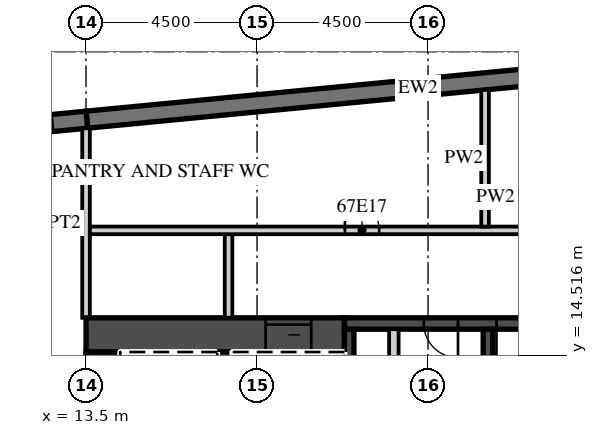
"""IFC4 building model, lengths in metres.
Left out: names, types, materials, properties, quantities, classifications, styles, units other than length and angle.
Written with IfcOpenShell. Run it as: python <this file> out.ifc"""

import sys

from ifc_helpers import new_model, si_unit, direction, frame, frame_2d, origin, place, context, subcontext, project, spatial, rectangle, extrude, element, fill, save


model = new_model("IFC4")
c1 = context("Model", 3, precision=1e-05, world=origin(), true_north=direction((0.0, 1.0)))
c2 = subcontext(c1, "Body", "Model", "MODEL_VIEW")
j1 = project(units=[si_unit("LENGTHUNIT", "METRE"), si_unit("PLANEANGLEUNIT", "RADIAN")], contexts=[c1])
p1 = place(None, origin())
s1 = spatial("IfcSite", under=j1, at=p1, CompositionType="ELEMENT")
p2 = place(p1, origin())
s2 = spatial("IfcBuilding", under=s1, at=p2, CompositionType="ELEMENT")
p3 = place(p2, frame((0.0, 0.0, 271.8)))
s3 = spatial("IfcBuildingStorey", under=s2, at=p3, CompositionType="ELEMENT", Elevation=271.8)
p4 = place(p3, frame((30.946, 22.391, 0.0), z_axis=(0.0, 0.0, 1.0), x_axis=(-0.995396397117, -0.095843688398, 0.0)))
e1 = element("IfcWall", 1, at=p4, inside=s3, PredefinedType="SOLIDWALL", context=c2, shape_type="SweptSolid", body=[
    extrude(rectangle(XDim=17.505, YDim=0.45, at=frame_2d((8.752, 0.0))), origin(), (0.0, 0.0, 1.0), 3.02),
])
p5 = place(p3, frame((13.521, 20.713, 0.0), z_axis=(0.0, 0.0, 1.0), x_axis=(-0.995396277313, -0.095844932638, 0.0)))
e2 = element("IfcWall", 2, at=p5, inside=s3, PredefinedType="SOLIDWALL", context=c2, shape_type="SweptSolid", body=[
    extrude(rectangle(XDim=51.495, YDim=0.45, at=frame_2d((25.748, 0.0))), origin(), (0.0, 0.0, 1.0), 3.02),
])
p6 = place(p5, frame((0.91, 0.0, 0.45)))
e3 = element("IfcOpeningElement", 3, at=p6, cuts=e2, PredefinedType="OPENING", context=c2, shape_type="SweptSolid", body=[
    extrude(rectangle(XDim=2.7, YDim=2.25, at=frame_2d((1.35, 1.125))), frame((0.0, 0.235, 0.0), z_axis=(0.0, -1.0, 0.0), x_axis=(1.0, 0.0, 0.0)), (0.0, 0.0, 1.0), 0.47),
])
p7 = place(p5, frame((5.431, 0.0, 0.45)))
e4 = element("IfcOpeningElement", 4, at=p7, cuts=e2, PredefinedType="OPENING", context=c2, shape_type="SweptSolid", body=[
    extrude(rectangle(XDim=2.7, YDim=2.25, at=frame_2d((1.35, 1.125))), frame((0.0, 0.235, 0.0), z_axis=(0.0, -1.0, 0.0), x_axis=(1.0, 0.0, 0.0)), (0.0, 0.0, 1.0), 0.47),
])
p8 = place(p5, frame((9.952, 0.0, 0.45)))
e5 = element("IfcOpeningElement", 5, at=p8, cuts=e2, PredefinedType="OPENING", context=c2, shape_type="SweptSolid", body=[
    extrude(rectangle(XDim=2.7, YDim=2.25, at=frame_2d((1.35, 1.125))), frame((0.0, 0.235, 0.0), z_axis=(0.0, -1.0, 0.0), x_axis=(1.0, 0.0, 0.0)), (0.0, 0.0, 1.0), 0.47),
])
p9 = place(p5, frame((14.473, 0.0, 0.45)))
e6 = element("IfcOpeningElement", 6, at=p9, cuts=e2, PredefinedType="OPENING", context=c2, shape_type="SweptSolid", body=[
    extrude(rectangle(XDim=2.7, YDim=2.25, at=frame_2d((1.35, 1.125))), frame((0.0, 0.235, 0.0), z_axis=(0.0, -1.0, 0.0), x_axis=(1.0, 0.0, 0.0)), (0.0, 0.0, 1.0), 0.47),
])
p10 = place(p5, frame((18.994, 0.0, 0.45)))
e7 = element("IfcOpeningElement", 7, at=p10, cuts=e2, PredefinedType="OPENING", context=c2, shape_type="SweptSolid", body=[
    extrude(rectangle(XDim=2.7, YDim=2.25, at=frame_2d((1.35, 1.125))), frame((0.0, 0.235, 0.0), z_axis=(0.0, -1.0, 0.0), x_axis=(1.0, 0.0, 0.0)), (0.0, 0.0, 1.0), 0.47),
])
p11 = place(p5, frame((23.514, 0.0, 0.45)))
e8 = element("IfcOpeningElement", 8, at=p11, cuts=e2, PredefinedType="OPENING", context=c2, shape_type="SweptSolid", body=[
    extrude(rectangle(XDim=2.7, YDim=2.25, at=frame_2d((1.35, 1.125))), frame((0.0, 0.235, 0.0), z_axis=(0.0, -1.0, 0.0), x_axis=(1.0, 0.0, 0.0)), (0.0, 0.0, 1.0), 0.47),
])
p12 = place(p5, frame((28.035, 0.0, 0.45)))
e9 = element("IfcOpeningElement", 9, at=p12, cuts=e2, PredefinedType="OPENING", context=c2, shape_type="SweptSolid", body=[
    extrude(rectangle(XDim=2.7, YDim=2.25, at=frame_2d((1.35, 1.125))), frame((0.0, 0.235, 0.0), z_axis=(0.0, -1.0, 0.0), x_axis=(1.0, 0.0, 0.0)), (0.0, 0.0, 1.0), 0.47),
])
p13 = place(p5, frame((32.556, 0.0, 0.45)))
e10 = element("IfcOpeningElement", 10, at=p13, cuts=e2, PredefinedType="OPENING", context=c2, shape_type="SweptSolid", body=[
    extrude(rectangle(XDim=2.7, YDim=2.25, at=frame_2d((1.35, 1.125))), frame((0.0, 0.235, 0.0), z_axis=(0.0, -1.0, 0.0), x_axis=(1.0, 0.0, 0.0)), (0.0, 0.0, 1.0), 0.47),
])
p14 = place(p5, frame((37.077, 0.0, 0.45)))
e11 = element("IfcOpeningElement", 11, at=p14, cuts=e2, PredefinedType="OPENING", context=c2, shape_type="SweptSolid", body=[
    extrude(rectangle(XDim=2.7, YDim=2.25, at=frame_2d((1.35, 1.125))), frame((0.0, 0.235, 0.0), z_axis=(0.0, -1.0, 0.0), x_axis=(1.0, 0.0, 0.0)), (0.0, 0.0, 1.0), 0.47),
])
p15 = place(p5, frame((41.598, 0.0, 0.45)))
e12 = element("IfcOpeningElement", 12, at=p15, cuts=e2, PredefinedType="OPENING", context=c2, shape_type="SweptSolid", body=[
    extrude(rectangle(XDim=2.7, YDim=2.25, at=frame_2d((1.35, 1.125))), frame((0.0, 0.235, 0.0), z_axis=(0.0, -1.0, 0.0), x_axis=(1.0, 0.0, 0.0)), (0.0, 0.0, 1.0), 0.47),
])
p16 = place(p5, frame((46.118, 0.0, 0.45)))
e13 = element("IfcOpeningElement", 13, at=p16, cuts=e2, PredefinedType="OPENING", context=c2, shape_type="SweptSolid", body=[
    extrude(rectangle(XDim=2.7, YDim=2.25, at=frame_2d((1.35, 1.125))), frame((0.0, 0.235, 0.0), z_axis=(0.0, -1.0, 0.0), x_axis=(1.0, 0.0, 0.0)), (0.0, 0.0, 1.0), 0.47),
])
p17 = place(p3, frame((13.5, 15.5, 0.0), z_axis=(0.0, 0.0, 1.0), x_axis=(0.0, 1.0, 0.0)))
e14 = element("IfcWall", 14, at=p17, inside=s3, PredefinedType="PARTITIONING", context=c2, shape_type="SweptSolid", body=[
    extrude(rectangle(XDim=4.985, YDim=0.2, at=frame_2d((2.493, 0.0))), origin(), (0.0, 0.0, 1.0), 3.02),
])
p18 = place(p3, frame((13.5, 15.05, 0.0), z_axis=(0.0, 0.0, 1.0), x_axis=(1.0, 0.0, 0.0)))
e15 = element("IfcWall", 15, at=p18, inside=s3, PredefinedType="SHEAR", context=c2, shape_type="SweptSolid", body=[
    extrude(rectangle(XDim=6.8, YDim=0.9, at=frame_2d((3.4, 0.0))), origin(), (0.0, 0.0, 1.0), 3.02),
])
p19 = place(p18, frame((4.725, 0.0, 0.0)))
e16 = element("IfcOpeningElement", 16, at=p19, cuts=e15, PredefinedType="OPENING", context=c2, shape_type="SweptSolid", body=[
    extrude(rectangle(XDim=1.2, YDim=2.1, at=frame_2d((0.6, 1.05))), frame((0.0, 0.46, 0.0), z_axis=(0.0, -1.0, 0.0), x_axis=(1.0, 0.0, 0.0)), (0.0, 0.0, 1.0), 0.92),
])
p20 = place(p3, frame((20.3, 15.35, 0.0), z_axis=(0.0, 0.0, 1.0), x_axis=(1.0, 0.0, 0.0)))
e17 = element("IfcWall", 17, at=p20, inside=s3, PredefinedType="SHEAR", context=c2, shape_type="SweptSolid", body=[
    extrude(rectangle(XDim=10.3, YDim=0.3, at=frame_2d((5.15, 0.0))), origin(), (0.0, 0.0, 1.0), 3.02),
])
p21 = place(p20, frame((4.0, 0.0, 0.0)))
e18 = element("IfcOpeningElement", 18, at=p21, cuts=e17, PredefinedType="OPENING", context=c2, shape_type="SweptSolid", body=[
    extrude(rectangle(XDim=1.3, YDim=2.1, at=frame_2d((0.65, 1.05))), frame((0.0, 0.16, 0.0), z_axis=(0.0, -1.0, 0.0), x_axis=(1.0, 0.0, 0.0)), (0.0, 0.0, 1.0), 0.32),
])
p22 = place(p20, frame((2.087, 0.0, 0.0)))
e19 = element("IfcOpeningElement", 19, at=p22, cuts=e17, PredefinedType="OPENING", context=c2, shape_type="SweptSolid", body=[
    extrude(rectangle(XDim=0.9, YDim=2.1, at=frame_2d((0.45, 1.05))), frame((0.0, 0.16, 0.0), z_axis=(0.0, -1.0, 0.0), x_axis=(1.0, 0.0, 0.0)), (0.0, 0.0, 1.0), 0.32),
])
p23 = place(p3, frame((13.95, 2.4, 0.0), z_axis=(0.0, 0.0, 1.0), x_axis=(0.0, 1.0, 0.0)))
e20 = element("IfcWall", 20, at=p23, inside=s3, PredefinedType="SHEAR", context=c2, shape_type="SweptSolid", body=[
    extrude(rectangle(XDim=12.2, YDim=0.9, at=frame_2d((6.1, 0.0))), origin(), (0.0, 0.0, 1.0), 3.02),
])
p24 = place(p3, frame((17.15, 8.8, 0.0), z_axis=(0.0, 0.0, 1.0), x_axis=(0.0, 1.0, 0.0)))
e21 = element("IfcWall", 21, at=p24, inside=s3, PredefinedType="SHEAR", context=c2, shape_type="SweptSolid", body=[
    extrude(rectangle(XDim=5.8, YDim=0.4, at=frame_2d((2.9, 0.0))), origin(), (0.0, 0.0, 1.0), 3.02),
])
for number, where, z_axis, x_axis in (
    (22, (20.425, 11.95, 0.0), (0.0, 0.0, 1.0), (0.0, 1.0, 0.0)),
    (23, (24.075, 11.95, 0.0), (0.0, 0.0, 1.0), (0.0, 1.0, 0.0)),
):
    element("IfcWall", number, at=place(p3, frame(where, z_axis=z_axis, x_axis=x_axis)), inside=s3, PredefinedType="SHEAR", context=c2, shape_type="SweptSolid", body=[
        extrude(rectangle(XDim=3.25, YDim=0.25, at=frame_2d((1.625, 0.0))), origin(), (0.0, 0.0, 1.0), 3.02),
    ])
p25 = place(p3, frame((21.6, 11.95, 0.0), z_axis=(0.0, 0.0, 1.0), x_axis=(0.0, 1.0, 0.0)))
e24 = element("IfcWall", 24, at=p25, inside=s3, PredefinedType="PARTITIONING", context=c2, shape_type="SweptSolid", body=[
    extrude(rectangle(XDim=3.25, YDim=0.25, at=frame_2d((1.625, 0.0))), origin(), (0.0, 0.0, 1.0), 3.02),
])
p26 = place(p3, frame((17.25, 15.5, 0.0), z_axis=(0.0, 0.0, 1.0), x_axis=(0.0, 1.0, 0.0)))
e25 = element("IfcWall", 25, at=p26, inside=s3, PredefinedType="PARTITIONING", context=c2, shape_type="SweptSolid", body=[
    extrude(rectangle(XDim=2.2, YDim=0.2, at=frame_2d((1.1, 0.0))), origin(), (0.0, 0.0, 1.0), 3.02),
])
p27 = place(p3, frame((13.6, 17.8, 0.0), z_axis=(0.0, 0.0, 1.0), x_axis=(1.0, 0.0, 0.0)))
e26 = element("IfcWall", 26, at=p27, inside=s3, PredefinedType="PARTITIONING", context=c2, shape_type="SweptSolid", body=[
    extrude(rectangle(XDim=21.354, YDim=0.2, at=frame_2d((10.677, 0.0))), origin(), (0.0, 0.0, 1.0), 3.02),
])
p28 = place(p27, frame((15.012, 0.0, 0.0)))
e27 = element("IfcOpeningElement", 27, at=p28, cuts=e26, PredefinedType="OPENING", context=c2, shape_type="SweptSolid", body=[
    extrude(rectangle(XDim=0.9, YDim=2.1, at=frame_2d((0.45, 1.05))), frame((0.0, 0.11, 0.0), z_axis=(0.0, -1.0, 0.0), x_axis=(1.0, 0.0, 0.0)), (0.0, 0.0, 1.0), 0.22),
])
p29 = place(p27, frame((6.712, 0.0, 0.0)))
e28 = element("IfcOpeningElement", 28, at=p29, cuts=e26, PredefinedType="OPENING", context=c2, shape_type="SweptSolid", body=[
    extrude(rectangle(XDim=0.9, YDim=2.1, at=frame_2d((0.45, 1.05))), frame((0.0, 0.11, 0.0), z_axis=(0.0, -1.0, 0.0), x_axis=(1.0, 0.0, 0.0)), (0.0, 0.0, 1.0), 0.22),
])
p30 = place(p3, frame((24.0, 17.9, 0.0), z_axis=(0.0, 0.0, 1.0), x_axis=(0.0, 1.0, 0.0)))
e29 = element("IfcWall", 29, at=p30, inside=s3, PredefinedType="PARTITIONING", context=c2, shape_type="SweptSolid", body=[
    extrude(rectangle(XDim=3.597, YDim=0.2, at=frame_2d((1.798, 0.0))), origin(), (0.0, 0.0, 1.0), 3.02),
])
p31 = place(p6, origin())
e30 = element("IfcWindow", 30, at=p31, inside=s3, PartitioningType="SINGLE_PANEL", PredefinedType="WINDOW", context=c2, shape_type="SweptSolid", body=[
    extrude(rectangle(XDim=2.7, YDim=2.25, at=frame_2d((1.35, 1.125))), frame((0.0, 0.09, 0.0), z_axis=(0.0, -1.0, 0.0), x_axis=(1.0, 0.0, 0.0)), (0.0, 0.0, 1.0), 0.06),
])
fill(e3, e30)
p32 = place(p19, origin())
e31 = element("IfcDoor", 31, at=p32, inside=s3, OperationType="SLIDING_TO_LEFT", PredefinedType="DOOR", context=c2, shape_type="SweptSolid", body=[
    extrude(rectangle(XDim=1.2, YDim=2.1, at=frame_2d((0.6, 1.05))), frame((0.0, 0.025, 0.0), z_axis=(0.0, -1.0, 0.0), x_axis=(1.0, 0.0, 0.0)), (0.0, 0.0, 1.0), 0.05),
])
fill(e16, e31)
p33 = place(p21, origin())
e32 = element("IfcDoor", 32, at=p33, inside=s3, OperationType="SINGLE_SWING_LEFT", PredefinedType="DOOR", context=c2, shape_type="SweptSolid", body=[
    extrude(rectangle(XDim=1.3, YDim=2.1, at=frame_2d((0.65, 1.05))), frame((0.0, 0.025, 0.0), z_axis=(0.0, -1.0, 0.0), x_axis=(1.0, 0.0, 0.0)), (0.0, 0.0, 1.0), 0.05),
])
fill(e18, e32)
p34 = place(p22, origin())
e33 = element("IfcDoor", 33, at=p34, inside=s3, OperationType="SINGLE_SWING_RIGHT", PredefinedType="DOOR", context=c2, shape_type="SweptSolid", body=[
    extrude(rectangle(XDim=0.9, YDim=2.1, at=frame_2d((0.45, 1.05))), frame((0.0, 0.025, 0.0), z_axis=(0.0, -1.0, 0.0), x_axis=(1.0, 0.0, 0.0)), (0.0, 0.0, 1.0), 0.05),
])
fill(e19, e33)
p35 = place(p29, origin())
e34 = element("IfcDoor", 34, at=p35, inside=s3, OperationType="SINGLE_SWING_LEFT", PredefinedType="DOOR", context=c2, shape_type="SweptSolid", body=[
    extrude(rectangle(XDim=0.9, YDim=2.1, at=frame_2d((0.45, 1.05))), frame((0.0, 0.025, 0.0), z_axis=(0.0, -1.0, 0.0), x_axis=(1.0, 0.0, 0.0)), (0.0, 0.0, 1.0), 0.05),
])
fill(e28, e34)
save(model, sys.argv[1])
